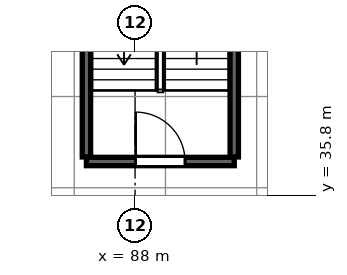
"""IFC4 building model, lengths in metres.
Left out: names, types, materials, properties, quantities, classifications, styles, units other than length and angle.
Written with IfcOpenShell. Run it as: python <this file> out.ifc"""

import sys

from ifc_helpers import new_model, si_unit, direction, frame, frame_2d, origin, place, context, subcontext, project, spatial, rectangle, extrude, source, transform, mapped, element, fill, save


model = new_model("IFC4")
c1 = context("Model", 3, precision=1e-05, world=origin(), true_north=direction((0.0, 1.0)))
c2 = subcontext(c1, "Body", "Model", "MODEL_VIEW")
j1 = project(units=[si_unit("LENGTHUNIT", "METRE"), si_unit("PLANEANGLEUNIT", "RADIAN")], contexts=[c1])
p1 = place(None, origin())
s1 = spatial("IfcSite", under=j1, at=p1, CompositionType="ELEMENT")
p2 = place(p1, origin())
s2 = spatial("IfcBuilding", under=s1, at=p2, CompositionType="ELEMENT")
p3 = place(p2, frame((0.0, 0.0, 12.0)))
s3 = spatial("IfcBuildingStorey", under=s2, at=p3, CompositionType="ELEMENT", Elevation=12.0)
m1 = source(origin(), c2, "Body", "SweptSolid", [
    extrude(rectangle(XDim=3.89, YDim=0.22, at=frame_2d((1.945, 0.0))), origin(), (0.0, 0.0, 1.0), 6.0),
])
p4 = place(p3, frame((86.72, 36.69, 0.0), z_axis=(0.0, 0.0, 1.0), x_axis=(1.0, 0.0, 0.0)))
e1 = element("IfcWall", 1, at=p4, inside=s3, PredefinedType="SOLIDWALL", context=c2, shape_type="MappedRepresentation", body=[
    mapped(m1, transform((0.0, 0.0, 0.0), scale=1.0)),
])
p5 = place(p4, frame((1.295, 0.0, 0.0)))
e2 = element("IfcOpeningElement", 2, at=p5, cuts=e1, PredefinedType="OPENING", context=c2, shape_type="SweptSolid", body=[
    extrude(rectangle(XDim=1.3, YDim=2.15, at=frame_2d((0.65, 1.075))), frame((0.0, 0.12, 0.0), z_axis=(0.0, -1.0, 0.0), x_axis=(1.0, 0.0, 0.0)), (0.0, 0.0, 1.0), 0.24),
])
m2 = source(origin(), c2, "Body", "SweptSolid", [
    extrude(rectangle(XDim=10.38, YDim=0.22, at=frame_2d((5.19, 0.0))), origin(), (0.0, 0.0, 1.0), 6.0),
])
for number, where, z_axis, x_axis in (
    (3, (86.72, 36.81, 0.0), (0.0, 0.0, 1.0), (0.0, 1.0, 0.0)),
    (4, (90.61, 36.81, 0.0), (0.0, 0.0, 1.0), (0.0, 1.0, 0.0)),
):
    element("IfcWall", number, at=place(p3, frame(where, z_axis=z_axis, x_axis=x_axis)), inside=s3, PredefinedType="SOLIDWALL", context=c2, shape_type="MappedRepresentation", body=[
        mapped(m2, transform((0.0, 0.0, 0.0), scale=1.0)),
    ])
m3 = source(origin(), c2, "Body", "SweptSolid", [
    extrude(rectangle(XDim=1.3, YDim=2.15, at=frame_2d((0.65, 1.075))), frame((0.0, 0.025, 0.0), z_axis=(0.0, -1.0, 0.0), x_axis=(1.0, 0.0, 0.0)), (0.0, 0.0, 1.0), 0.05),
])
p6 = place(p5, origin())
e5 = element("IfcDoor", 5, at=p6, inside=s3, OperationType="SINGLE_SWING_LEFT", PredefinedType="DOOR", context=c2, shape_type="MappedRepresentation", body=[
    mapped(m3, transform((0.0, 0.0, 0.0), scale=1.0)),
])
fill(e2, e5)
save(model, sys.argv[1])
